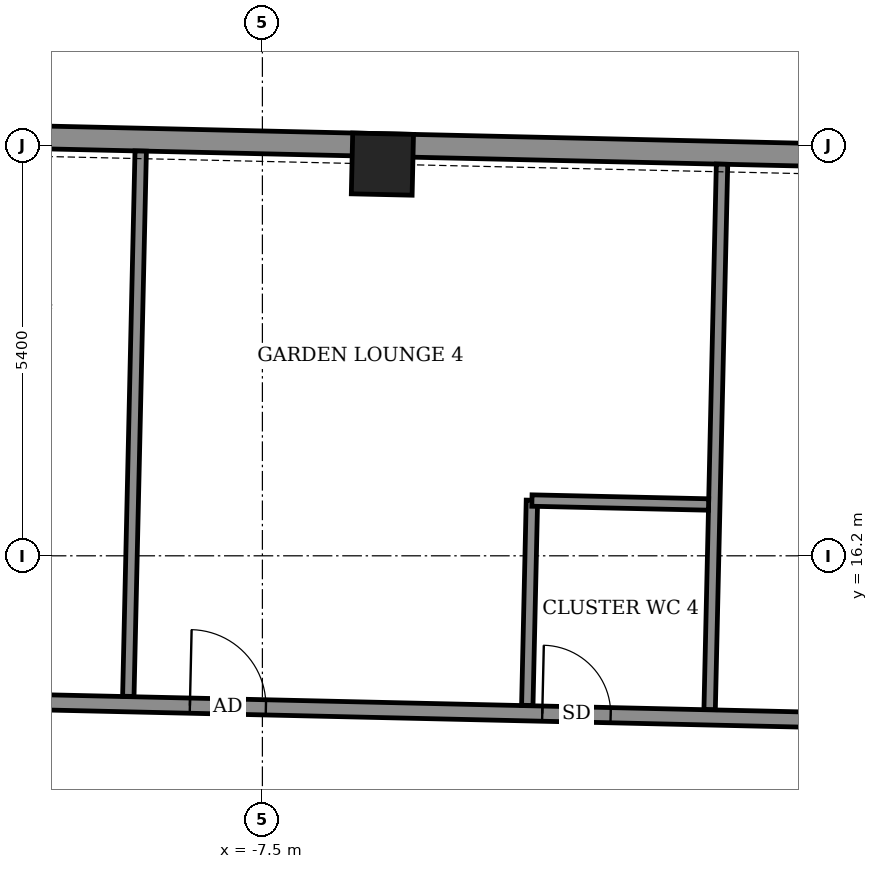
"""IFC4 building model, lengths in metres.
Left out: names, types, materials, properties, quantities, classifications, styles, units other than length and angle.
Written with IfcOpenShell. Run it as: python <this file> out.ifc"""

import sys

from ifc_helpers import new_model, si_unit, direction, frame, frame_2d, origin, origin_2d, place, context, subcontext, project, spatial, rectangle, extrude, element, fill, save


model = new_model("IFC4")
c1 = context("Model", 3, precision=1e-05, world=origin(), true_north=direction((0.0, 1.0)))
c2 = subcontext(c1, "Body", "Model", "MODEL_VIEW")
j1 = project(units=[si_unit("LENGTHUNIT", "METRE"), si_unit("PLANEANGLEUNIT", "RADIAN")], contexts=[c1])
p1 = place(None, origin())
s1 = spatial("IfcSite", under=j1, at=p1, CompositionType="ELEMENT")
p2 = place(p1, origin())
s2 = spatial("IfcBuilding", under=s1, at=p2, CompositionType="ELEMENT")
p3 = place(p2, frame((0.0, 0.0, 342.5)))
s3 = spatial("IfcBuildingStorey", under=s2, at=p3, CompositionType="ELEMENT", Elevation=342.5)
p4 = place(p3, frame((-5.921, 21.353, -0.55), z_axis=(0.0, 0.0, 1.0), x_axis=(-0.999742990499, 0.022670530375, 0.0)))
e1 = element("IfcColumn", 1, at=p4, inside=s3, PredefinedType="COLUMN", context=c2, shape_type="SweptSolid", body=[
    extrude(rectangle(XDim=0.8, YDim=0.8, at=origin_2d()), origin(), (0.0, 0.0, 1.0), 3.6),
])
p5 = place(p3, frame((23.394, 20.938, 0.0), z_axis=(0.0, 0.0, 1.0), x_axis=(-0.99974255281, 0.02268982375, 0.0)))
e2 = element("IfcWall", 2, at=p5, inside=s3, PredefinedType="SOLIDWALL", context=c2, shape_type="SweptSolid", body=[
    extrude(rectangle(XDim=43.9, YDim=0.3, at=frame_2d((21.95, 0.0))), origin(), (0.0, 0.0, 1.0), 2.5),
])
p6 = place(p3, frame((-19.132, 14.471, 0.0), z_axis=(0.0, 0.0, 1.0), x_axis=(0.999742846934, -0.022676860534, 0.0)))
e3 = element("IfcWall", 3, at=p6, inside=s3, PredefinedType="PARTITIONING", context=c2, shape_type="SweptSolid", body=[
    extrude(rectangle(XDim=40.836, YDim=0.2, at=frame_2d((20.418, 0.0))), origin(), (0.0, 0.0, 1.0), 3.05),
])
p7 = place(p6, frame((38.379, 0.0, 0.0)))
e4 = element("IfcOpeningElement", 4, at=p7, cuts=e3, PredefinedType="OPENING", context=c2, shape_type="SweptSolid", body=[
    extrude(rectangle(XDim=1.0, YDim=2.1, at=frame_2d((0.5, 1.05))), frame((0.0, 0.11, 0.0), z_axis=(0.0, -1.0, 0.0), x_axis=(1.0, 0.0, 0.0)), (0.0, 0.0, 1.0), 0.22),
])
p8 = place(p6, frame((35.768, 0.0, 0.0)))
e5 = element("IfcOpeningElement", 5, at=p8, cuts=e3, PredefinedType="OPENING", context=c2, shape_type="SweptSolid", body=[
    extrude(rectangle(XDim=0.9, YDim=2.1, at=frame_2d((0.45, 1.05))), frame((0.0, 0.11, 0.0), z_axis=(0.0, -1.0, 0.0), x_axis=(1.0, 0.0, 0.0)), (0.0, 0.0, 1.0), 0.22),
])
p9 = place(p6, frame((31.451, 0.0, 0.0)))
e6 = element("IfcOpeningElement", 6, at=p9, cuts=e3, PredefinedType="OPENING", context=c2, shape_type="SweptSolid", body=[
    extrude(rectangle(XDim=1.0, YDim=2.1, at=frame_2d((0.5, 1.05))), frame((0.0, 0.11, 0.0), z_axis=(0.0, -1.0, 0.0), x_axis=(1.0, 0.0, 0.0)), (0.0, 0.0, 1.0), 0.22),
])
p10 = place(p6, frame((28.868, 0.0, 0.0)))
e7 = element("IfcOpeningElement", 7, at=p10, cuts=e3, PredefinedType="OPENING", context=c2, shape_type="SweptSolid", body=[
    extrude(rectangle(XDim=0.9, YDim=2.1, at=frame_2d((0.45, 1.05))), frame((0.0, 0.11, 0.0), z_axis=(0.0, -1.0, 0.0), x_axis=(1.0, 0.0, 0.0)), (0.0, 0.0, 1.0), 0.22),
])
p11 = place(p6, frame((24.743, 0.0, 0.0)))
e8 = element("IfcOpeningElement", 8, at=p11, cuts=e3, PredefinedType="OPENING", context=c2, shape_type="SweptSolid", body=[
    extrude(rectangle(XDim=1.0, YDim=2.1, at=frame_2d((0.5, 1.05))), frame((0.0, 0.11, 0.0), z_axis=(0.0, -1.0, 0.0), x_axis=(1.0, 0.0, 0.0)), (0.0, 0.0, 1.0), 0.22),
])
p12 = place(p6, frame((19.119, 0.0, 0.0)))
e9 = element("IfcOpeningElement", 9, at=p12, cuts=e3, PredefinedType="OPENING", context=c2, shape_type="SweptSolid", body=[
    extrude(rectangle(XDim=1.0, YDim=2.1, at=frame_2d((0.5, 1.05))), frame((0.0, 0.11, 0.0), z_axis=(0.0, -1.0, 0.0), x_axis=(1.0, 0.0, 0.0)), (0.0, 0.0, 1.0), 0.22),
])
p13 = place(p6, frame((10.681, 0.0, 0.0)))
e10 = element("IfcOpeningElement", 10, at=p13, cuts=e3, PredefinedType="OPENING", context=c2, shape_type="SweptSolid", body=[
    extrude(rectangle(XDim=1.0, YDim=2.1, at=frame_2d((0.5, 1.05))), frame((0.0, 0.11, 0.0), z_axis=(0.0, -1.0, 0.0), x_axis=(1.0, 0.0, 0.0)), (0.0, 0.0, 1.0), 0.22),
])
p14 = place(p6, frame((15.318, 0.0, 0.0)))
e11 = element("IfcOpeningElement", 11, at=p14, cuts=e3, PredefinedType="OPENING", context=c2, shape_type="SweptSolid", body=[
    extrude(rectangle(XDim=0.9, YDim=2.1, at=frame_2d((0.45, 1.05))), frame((0.0, 0.11, 0.0), z_axis=(0.0, -1.0, 0.0), x_axis=(1.0, 0.0, 0.0)), (0.0, 0.0, 1.0), 0.22),
])
p15 = place(p6, frame((6.868, 0.0, 0.0)))
e12 = element("IfcOpeningElement", 12, at=p15, cuts=e3, PredefinedType="OPENING", context=c2, shape_type="SweptSolid", body=[
    extrude(rectangle(XDim=1.0, YDim=2.1, at=frame_2d((0.5, 1.05))), frame((0.0, 0.11, 0.0), z_axis=(0.0, -1.0, 0.0), x_axis=(1.0, 0.0, 0.0)), (0.0, 0.0, 1.0), 0.22),
])
p16 = place(p6, frame((4.268, 0.0, 0.0)))
e13 = element("IfcOpeningElement", 13, at=p16, cuts=e3, PredefinedType="OPENING", context=c2, shape_type="SweptSolid", body=[
    extrude(rectangle(XDim=0.9, YDim=2.1, at=frame_2d((0.45, 1.05))), frame((0.0, 0.11, 0.0), z_axis=(0.0, -1.0, 0.0), x_axis=(1.0, 0.0, 0.0)), (0.0, 0.0, 1.0), 0.22),
])
p17 = place(p6, frame((0.2, 0.0, 0.0)))
e14 = element("IfcOpeningElement", 14, at=p17, cuts=e3, PredefinedType="OPENING", context=c2, shape_type="SweptSolid", body=[
    extrude(rectangle(XDim=1.0, YDim=2.1, at=frame_2d((0.5, 1.05))), frame((0.0, 0.11, 0.0), z_axis=(0.0, -1.0, 0.0), x_axis=(1.0, 0.0, 0.0)), (0.0, 0.0, 1.0), 0.22),
])
p18 = place(p6, frame((1.668, 0.0, 0.0)))
e15 = element("IfcOpeningElement", 15, at=p18, cuts=e3, PredefinedType="OPENING", context=c2, shape_type="SweptSolid", body=[
    extrude(rectangle(XDim=0.9, YDim=2.1, at=frame_2d((0.45, 1.05))), frame((0.0, 0.11, 0.0), z_axis=(0.0, -1.0, 0.0), x_axis=(1.0, 0.0, 0.0)), (0.0, 0.0, 1.0), 0.22),
])
p19 = place(p3, frame((-9.264, 14.351, 0.0), z_axis=(0.0, 0.0, 1.0), x_axis=(0.02269358242, 0.999742467497, 0.0)))
e16 = element("IfcWall", 16, at=p19, inside=s3, PredefinedType="PARTITIONING", context=c2, shape_type="SweptSolid", body=[
    extrude(rectangle(XDim=7.176, YDim=0.15, at=frame_2d((3.588, 0.0))), origin(), (0.0, 0.0, 1.0), 2.5),
])
p20 = place(p3, frame((-4.015, 14.232, 0.0), z_axis=(0.0, 0.0, 1.0), x_axis=(0.022518033722, 0.999746436932, 0.0)))
e17 = element("IfcWall", 17, at=p20, inside=s3, PredefinedType="PARTITIONING", context=c2, shape_type="SweptSolid", body=[
    extrude(rectangle(XDim=2.7, YDim=0.15, at=frame_2d((1.35, 0.0))), origin(), (0.0, 0.0, 1.0), 3.05),
])
p21 = place(p3, frame((-1.616, 14.178, 0.0), z_axis=(0.0, 0.0, 1.0), x_axis=(0.022726815178, 0.99974171258, 0.0)))
e18 = element("IfcWall", 18, at=p21, inside=s3, PredefinedType="PARTITIONING", context=c2, shape_type="SweptSolid", body=[
    extrude(rectangle(XDim=7.176, YDim=0.15, at=frame_2d((3.588, 0.0))), origin(), (0.0, 0.0, 1.0), 2.5),
])
p22 = place(p3, frame((-3.954, 16.927, 0.0), z_axis=(0.0, 0.0, 1.0), x_axis=(0.999749797124, -0.022368351553, 0.0)))
e19 = element("IfcWall", 19, at=p22, inside=s3, PredefinedType="PARTITIONING", context=c2, shape_type="SweptSolid", body=[
    extrude(rectangle(XDim=2.325, YDim=0.15, at=frame_2d((1.162, 0.0))), origin(), (0.0, 0.0, 1.0), 3.05),
])
p23 = place(p13, origin())
e20 = element("IfcDoor", 20, at=p23, inside=s3, OperationType="SINGLE_SWING_RIGHT", PredefinedType="DOOR", context=c2, shape_type="SweptSolid", body=[
    extrude(rectangle(XDim=1.0, YDim=2.1, at=frame_2d((0.5, 1.05))), frame((0.0, 0.025, 0.0), z_axis=(0.0, -1.0, 0.0), x_axis=(1.0, 0.0, 0.0)), (0.0, 0.0, 1.0), 0.05),
])
fill(e10, e20)
p24 = place(p14, origin())
e21 = element("IfcDoor", 21, at=p24, inside=s3, OperationType="SINGLE_SWING_RIGHT", PredefinedType="DOOR", context=c2, shape_type="SweptSolid", body=[
    extrude(rectangle(XDim=0.9, YDim=2.1, at=frame_2d((0.45, 1.05))), frame((0.0, 0.025, 0.0), z_axis=(0.0, -1.0, 0.0), x_axis=(1.0, 0.0, 0.0)), (0.0, 0.0, 1.0), 0.05),
])
fill(e11, e21)
save(model, sys.argv[1])
